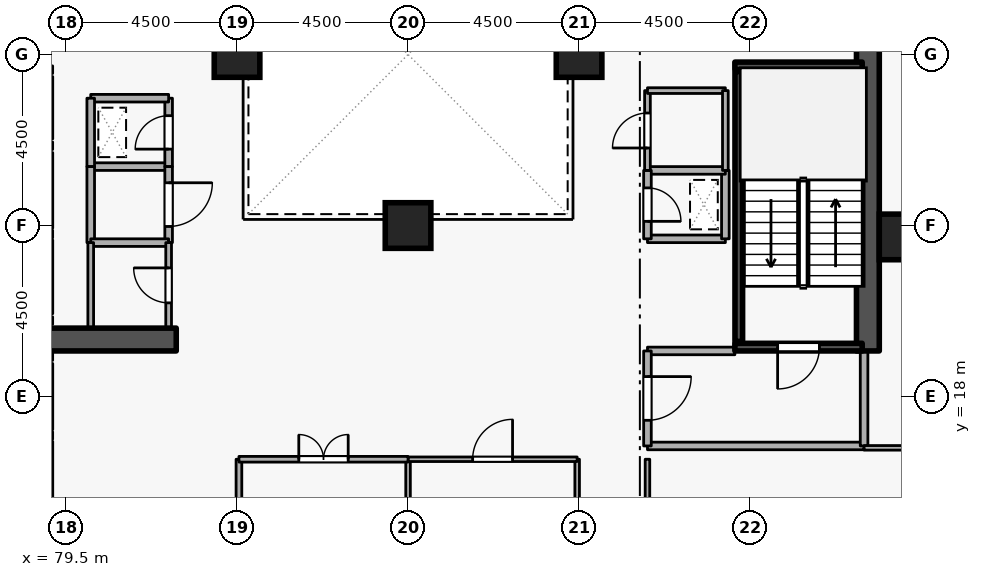
"""IFC4 building model, lengths in metres.
Left out: names, types, materials, properties, quantities, classifications, styles, units other than length and angle.
Written with IfcOpenShell. Run it as: python <this file> out.ifc"""

import sys

from ifc_helpers import new_model, si_unit, direction, frame, frame_2d, origin, origin_2d, place, context, subcontext, project, spatial, rectangle, extrude, element, fill, save


model = new_model("IFC4")
c1 = context("Model", 3, precision=1e-05, world=origin(), true_north=direction((0.0, 1.0)))
c2 = subcontext(c1, "Body", "Model", "MODEL_VIEW")
j1 = project(units=[si_unit("LENGTHUNIT", "METRE"), si_unit("PLANEANGLEUNIT", "RADIAN")], contexts=[c1])
p1 = place(None, origin())
s1 = spatial("IfcSite", under=j1, at=p1, CompositionType="ELEMENT")
p2 = place(p1, origin())
s2 = spatial("IfcBuilding", under=s1, at=p2, CompositionType="ELEMENT")
p3 = place(p2, frame((0.0, 0.0, 83.7)))
s3 = spatial("IfcBuildingStorey", under=s2, at=p3, CompositionType="ELEMENT", Elevation=83.7)
p4 = place(p3, frame((100.6, 19.2, 0.0), z_axis=(0.0, 0.0, 1.0), x_axis=(0.0, 1.0, 0.0)))
e1 = element("IfcWall", 1, at=p4, inside=s3, PredefinedType="SHEAR", context=c2, shape_type="SweptSolid", body=[
    extrude(rectangle(XDim=15.6, YDim=0.6, at=frame_2d((7.8, 0.0))), origin(), (0.0, 0.0, 1.0), 3.6),
])
p5 = place(p3, frame((76.7, 19.5, 0.0), z_axis=(0.0, 0.0, 1.0), x_axis=(1.0, 0.0, 0.0)))
e2 = element("IfcWall", 2, at=p5, inside=s3, PredefinedType="SHEAR", context=c2, shape_type="SweptSolid", body=[
    extrude(rectangle(XDim=5.7, YDim=0.6, at=frame_2d((2.85, 0.0))), origin(), (0.0, 0.0, 1.0), 3.6),
])
for number, where, z_axis, x_axis in (
    (3, (101.5, 22.2, 0.0), (0.0, 0.0, 1.0), (1.0, 0.0, 0.0)),
    (4, (93.0, 27.0, 0.0), (0.0, 0.0, 1.0), (1.0, 0.0, 0.0)),
    (5, (84.0, 27.0, 0.0), (0.0, 0.0, 1.0), (1.0, 0.0, 0.0)),
    (6, (88.5, 22.5, 0.0), (0.0, 0.0, 1.0), (1.0, 0.0, 0.0)),
):
    element("IfcColumn", number, at=place(p3, frame(where, z_axis=z_axis, x_axis=x_axis)), inside=s3, PredefinedType="COLUMN", context=c2, shape_type="SweptSolid", body=[
        extrude(rectangle(XDim=1.2, YDim=1.2, at=origin_2d()), origin(), (0.0, 0.0, 1.0), 3.6),
    ])
p6 = place(p3, frame((79.05, 24.78, 0.0), z_axis=(0.0, 0.0, 1.0), x_axis=(0.0, 1.0, 0.0)))
e7 = element("IfcWall", 7, at=p6, inside=s3, PredefinedType="STANDARD", context=c2, shape_type="SweptSolid", body=[
    extrude(rectangle(XDim=1.64, YDim=0.2, at=frame_2d((0.82, 0.0))), origin(), (0.0, 0.0, 1.0), 3.34),
])
p7 = place(p6, frame((0.31, 0.0, 0.0)))
e8 = element("IfcOpeningElement", 8, at=p7, cuts=e7, PredefinedType="OPENING", context=c2, shape_type="SweptSolid", body=[
    extrude(rectangle(XDim=1.02, YDim=2.06, at=frame_2d((0.51, 1.03))), frame((0.0, 0.11, 0.0), z_axis=(0.0, -1.0, 0.0), x_axis=(1.0, 0.0, 0.0)), (0.0, 0.0, 1.0), 0.22),
])
p8 = place(p3, frame((79.05, 22.43, 0.0), z_axis=(0.0, 0.0, 1.0), x_axis=(0.0, 1.0, 0.0)))
e9 = element("IfcWall", 9, at=p8, inside=s3, PredefinedType="STANDARD", context=c2, shape_type="SweptSolid", body=[
    extrude(rectangle(XDim=1.99, YDim=0.2, at=frame_2d((0.995, 0.0))), origin(), (0.0, 0.0, 1.0), 3.34),
])
p9 = place(p3, frame((79.05, 20.18, 0.0), z_axis=(0.0, 0.0, 1.0), x_axis=(0.0, 1.0, 0.0)))
e10 = element("IfcWall", 10, at=p9, inside=s3, PredefinedType="STANDARD", context=c2, shape_type="SweptSolid", body=[
    extrude(rectangle(XDim=1.94, YDim=0.2, at=frame_2d((0.97, 0.0))), origin(), (0.0, 0.0, 1.0), 3.34),
])
p10 = place(p3, frame((79.05, 17.13, 0.0), z_axis=(0.0, 0.0, 1.0), x_axis=(0.0, 1.0, 0.0)))
e11 = element("IfcWall", 11, at=p10, inside=s3, PredefinedType="STANDARD", context=c2, shape_type="SweptSolid", body=[
    extrude(rectangle(XDim=1.74, YDim=0.2, at=frame_2d((0.87, 0.0))), origin(), (0.0, 0.0, 1.0), 3.34),
])
p11 = place(p10, frame((0.36, 0.0, 0.0)))
e12 = element("IfcOpeningElement", 12, at=p11, cuts=e11, PredefinedType="OPENING", context=c2, shape_type="SweptSolid", body=[
    extrude(rectangle(XDim=1.02, YDim=2.06, at=frame_2d((0.51, 1.03))), frame((0.0, 0.11, 0.0), z_axis=(0.0, -1.0, 0.0), x_axis=(1.0, 0.0, 0.0)), (0.0, 0.0, 1.0), 0.22),
])
p12 = place(p3, frame((79.05, 15.03, 0.0), z_axis=(0.0, 0.0, 1.0), x_axis=(0.0, 1.0, 0.0)))
e13 = element("IfcWall", 13, at=p12, inside=s3, PredefinedType="STANDARD", context=c2, shape_type="SweptSolid", body=[
    extrude(rectangle(XDim=1.79, YDim=0.2, at=frame_2d((0.895, 0.0))), origin(), (0.0, 0.0, 1.0), 3.34),
])
p13 = place(p12, frame((0.385, 0.0, 0.0)))
e14 = element("IfcOpeningElement", 14, at=p13, cuts=e13, PredefinedType="OPENING", context=c2, shape_type="SweptSolid", body=[
    extrude(rectangle(XDim=1.02, YDim=2.06, at=frame_2d((0.51, 1.03))), frame((0.0, 0.11, 0.0), z_axis=(0.0, -1.0, 0.0), x_axis=(1.0, 0.0, 0.0)), (0.0, 0.0, 1.0), 0.22),
])
p14 = place(p3, frame((100.45, 19.3, 0.0), z_axis=(0.0, 0.0, 1.0), x_axis=(-1.0, 0.0, 0.0)))
e15 = element("IfcWall", 15, at=p14, inside=s3, PredefinedType="SHEAR", context=c2, shape_type="SweptSolid", body=[
    extrude(rectangle(XDim=3.35, YDim=0.2, at=frame_2d((1.675, 0.0))), origin(), (0.0, 0.0, 1.0), 3.6),
])
p15 = place(p14, frame((1.125, 0.0, 0.0)))
e16 = element("IfcOpeningElement", 16, at=p15, cuts=e15, PredefinedType="OPENING", context=c2, shape_type="SweptSolid", body=[
    extrude(rectangle(XDim=1.1, YDim=2.1, at=frame_2d((0.55, 1.05))), frame((0.0, 0.11, 0.0), z_axis=(0.0, -1.0, 0.0), x_axis=(1.0, 0.0, 0.0)), (0.0, 0.0, 1.0), 0.22),
])
p16 = place(p3, frame((97.1, 26.7, 0.0), z_axis=(0.0, 0.0, 1.0), x_axis=(1.0, 0.0, 0.0)))
e17 = element("IfcWall", 17, at=p16, inside=s3, PredefinedType="SHEAR", context=c2, shape_type="SweptSolid", body=[
    extrude(rectangle(XDim=3.35, YDim=0.2, at=frame_2d((1.675, 0.0))), origin(), (0.0, 0.0, 1.0), 3.6),
])
p17 = place(p3, frame((97.203, 26.55, 0.0), z_axis=(0.0, 0.0, 1.0), x_axis=(0.0, -1.0, 0.0)))
e18 = element("IfcWall", 18, at=p17, inside=s3, PredefinedType="SHEAR", context=c2, shape_type="SweptSolid", body=[
    extrude(rectangle(XDim=7.1, YDim=0.2, at=frame_2d((3.55, 0.0))), origin(), (0.0, 0.0, 1.0), 3.6),
])
p18 = place(p3, frame((94.8, 16.7, 0.0), z_axis=(0.0, 0.0, 1.0), x_axis=(1.0, 0.0, 0.0)))
e19 = element("IfcWall", 19, at=p18, inside=s3, PredefinedType="STANDARD", context=c2, shape_type="SweptSolid", body=[
    extrude(rectangle(XDim=5.7, YDim=0.2, at=frame_2d((2.85, 0.0))), origin(), (0.0, 0.0, 1.0), 3.34),
])
p19 = place(p3, frame((100.5, 16.7, 0.0), z_axis=(0.0, 0.0, 1.0), x_axis=(0.0, 1.0, 0.0)))
e20 = element("IfcWall", 20, at=p19, inside=s3, PredefinedType="STANDARD", context=c2, shape_type="SweptSolid", body=[
    extrude(rectangle(XDim=2.5, YDim=0.2, at=frame_2d((1.25, 0.0))), origin(), (0.0, 0.0, 1.0), 3.34),
])
p20 = place(p3, frame((97.1, 19.2, 0.0), z_axis=(0.0, 0.0, 1.0), x_axis=(-1.0, 0.0, 0.0)))
e21 = element("IfcWall", 21, at=p20, inside=s3, PredefinedType="STANDARD", context=c2, shape_type="SweptSolid", body=[
    extrude(rectangle(XDim=2.3, YDim=0.2, at=frame_2d((1.15, 0.0))), origin(), (0.0, 0.0, 1.0), 2.545),
])
p21 = place(p3, frame((94.8, 19.2, 0.0), z_axis=(0.0, 0.0, 1.0), x_axis=(0.0, -1.0, 0.0)))
e22 = element("IfcWall", 22, at=p21, inside=s3, PredefinedType="STANDARD", context=c2, shape_type="SweptSolid", body=[
    extrude(rectangle(XDim=2.5, YDim=0.2, at=frame_2d((1.25, 0.0))), origin(), (0.0, 0.0, 1.0), 3.34),
])
p22 = place(p21, frame((0.675, 0.0, 0.0)))
e23 = element("IfcOpeningElement", 23, at=p22, cuts=e22, PredefinedType="OPENING", context=c2, shape_type="SweptSolid", body=[
    extrude(rectangle(XDim=1.15, YDim=2.1, at=frame_2d((0.575, 1.05))), frame((0.0, 0.11, 0.0), z_axis=(0.0, -1.0, 0.0), x_axis=(1.0, 0.0, 0.0)), (0.0, 0.0, 1.0), 0.22),
])
p23 = place(p3, frame((94.8, 22.15, 0.0), z_axis=(0.0, 0.0, 1.0), x_axis=(1.0, 0.0, 0.0)))
e24 = element("IfcWall", 24, at=p23, inside=s3, PredefinedType="STANDARD", context=c2, shape_type="SweptSolid", body=[
    extrude(rectangle(XDim=2.05, YDim=0.2, at=frame_2d((1.025, 0.0))), origin(), (0.0, 0.0, 1.0), 3.34),
])
p24 = place(p3, frame((96.85, 22.15, 0.0), z_axis=(0.0, 0.0, 1.0), x_axis=(0.0, 1.0, 0.0)))
e25 = element("IfcWall", 25, at=p24, inside=s3, PredefinedType="STANDARD", context=c2, shape_type="SweptSolid", body=[
    extrude(rectangle(XDim=1.8, YDim=0.2, at=frame_2d((0.9, 0.0))), origin(), (0.0, 0.0, 1.0), 3.34),
])
p25 = place(p3, frame((96.85, 23.95, 0.0), z_axis=(0.0, 0.0, 1.0), x_axis=(-1.0, 0.0, 0.0)))
e26 = element("IfcWall", 26, at=p25, inside=s3, PredefinedType="STANDARD", context=c2, shape_type="SweptSolid", body=[
    extrude(rectangle(XDim=2.05, YDim=0.2, at=frame_2d((1.025, 0.0))), origin(), (0.0, 0.0, 1.0), 3.34),
])
p26 = place(p3, frame((94.8, 23.95, 0.0), z_axis=(0.0, 0.0, 1.0), x_axis=(0.0, -1.0, 0.0)))
e27 = element("IfcWall", 27, at=p26, inside=s3, PredefinedType="STANDARD", context=c2, shape_type="SweptSolid", body=[
    extrude(rectangle(XDim=1.8, YDim=0.2, at=frame_2d((0.9, 0.0))), origin(), (0.0, 0.0, 1.0), 3.34),
])
p27 = place(p26, frame((0.46, 0.0, 0.0)))
e28 = element("IfcOpeningElement", 28, at=p27, cuts=e27, PredefinedType="OPENING", context=c2, shape_type="SweptSolid", body=[
    extrude(rectangle(XDim=0.88, YDim=2.04, at=frame_2d((0.44, 1.02))), frame((0.0, 0.11, 0.0), z_axis=(0.0, -1.0, 0.0), x_axis=(1.0, 0.0, 0.0)), (0.0, 0.0, 1.0), 0.22),
])
p28 = place(p3, frame((80.15, 24.05, 0.0), z_axis=(0.0, 0.0, 1.0), x_axis=(1.0, 0.0, 0.0)))
e29 = element("IfcWall", 29, at=p28, inside=s3, PredefinedType="STANDARD", context=c2, shape_type="SweptSolid", body=[
    extrude(rectangle(XDim=2.05, YDim=0.2, at=frame_2d((1.025, 0.0))), origin(), (0.0, 0.0, 1.0), 3.34),
])
p29 = place(p3, frame((82.2, 24.05, 0.0), z_axis=(0.0, 0.0, 1.0), x_axis=(0.0, 1.0, 0.0)))
e30 = element("IfcWall", 30, at=p29, inside=s3, PredefinedType="STANDARD", context=c2, shape_type="SweptSolid", body=[
    extrude(rectangle(XDim=1.8, YDim=0.2, at=frame_2d((0.9, 0.0))), origin(), (0.0, 0.0, 1.0), 3.34),
])
p30 = place(p29, frame((0.46, 0.0, 0.0)))
e31 = element("IfcOpeningElement", 31, at=p30, cuts=e30, PredefinedType="OPENING", context=c2, shape_type="SweptSolid", body=[
    extrude(rectangle(XDim=0.88, YDim=2.04, at=frame_2d((0.44, 1.02))), frame((0.0, 0.11, 0.0), z_axis=(0.0, -1.0, 0.0), x_axis=(1.0, 0.0, 0.0)), (0.0, 0.0, 1.0), 0.22),
])
p31 = place(p3, frame((82.2, 25.85, 0.0), z_axis=(0.0, 0.0, 1.0), x_axis=(-1.0, 0.0, 0.0)))
e32 = element("IfcWall", 32, at=p31, inside=s3, PredefinedType="STANDARD", context=c2, shape_type="SweptSolid", body=[
    extrude(rectangle(XDim=2.05, YDim=0.2, at=frame_2d((1.025, 0.0))), origin(), (0.0, 0.0, 1.0), 3.34),
])
p32 = place(p3, frame((80.15, 25.85, 0.0), z_axis=(0.0, 0.0, 1.0), x_axis=(0.0, -1.0, 0.0)))
e33 = element("IfcWall", 33, at=p32, inside=s3, PredefinedType="STANDARD", context=c2, shape_type="SweptSolid", body=[
    extrude(rectangle(XDim=1.8, YDim=0.2, at=frame_2d((0.9, 0.0))), origin(), (0.0, 0.0, 1.0), 3.34),
])
p33 = place(p3, frame((80.15, 22.05, 0.0), z_axis=(0.0, 0.0, 1.0), x_axis=(0.0, 1.0, 0.0)))
e34 = element("IfcWall", 34, at=p33, inside=s3, PredefinedType="STANDARD", context=c2, shape_type="SweptSolid", body=[
    extrude(rectangle(XDim=2.0, YDim=0.2, at=frame_2d((1.0, 0.0))), origin(), (0.0, 0.0, 1.0), 3.34),
])
p34 = place(p3, frame((82.2, 24.05, 0.0), z_axis=(0.0, 0.0, 1.0), x_axis=(0.0, -1.0, 0.0)))
e35 = element("IfcWall", 35, at=p34, inside=s3, PredefinedType="STANDARD", context=c2, shape_type="SweptSolid", body=[
    extrude(rectangle(XDim=2.0, YDim=0.2, at=frame_2d((1.0, 0.0))), origin(), (0.0, 0.0, 1.0), 3.34),
])
p35 = place(p34, frame((0.425, 0.0, 0.0)))
e36 = element("IfcOpeningElement", 36, at=p35, cuts=e35, PredefinedType="OPENING", context=c2, shape_type="SweptSolid", body=[
    extrude(rectangle(XDim=1.15, YDim=2.1, at=frame_2d((0.575, 1.05))), frame((0.0, 0.11, 0.0), z_axis=(0.0, -1.0, 0.0), x_axis=(1.0, 0.0, 0.0)), (0.0, 0.0, 1.0), 0.22),
])
p36 = place(p3, frame((82.2, 22.05, 0.0), z_axis=(0.0, 0.0, 1.0), x_axis=(-1.0, 0.0, 0.0)))
e37 = element("IfcWall", 37, at=p36, inside=s3, PredefinedType="STANDARD", context=c2, shape_type="SweptSolid", body=[
    extrude(rectangle(XDim=2.05, YDim=0.2, at=frame_2d((1.025, 0.0))), origin(), (0.0, 0.0, 1.0), 3.34),
])
p37 = place(p3, frame((94.8, 23.95, 0.0), z_axis=(0.0, 0.0, 1.0), x_axis=(0.0, 1.0, 0.0)))
e38 = element("IfcWall", 38, at=p37, inside=s3, PredefinedType="PARTITIONING", context=c2, shape_type="SweptSolid", body=[
    extrude(rectangle(XDim=2.1, YDim=0.15, at=frame_2d((1.05, 0.0))), origin(), (0.0, 0.0, 1.0), 3.34),
])
p38 = place(p37, frame((0.59, 0.0, 0.0)))
e39 = element("IfcOpeningElement", 39, at=p38, cuts=e38, PredefinedType="OPENING", context=c2, shape_type="SweptSolid", body=[
    extrude(rectangle(XDim=0.92, YDim=2.08, at=frame_2d((0.46, 1.04))), frame((0.0, 0.085, 0.0), z_axis=(0.0, -1.0, 0.0), x_axis=(1.0, 0.0, 0.0)), (0.0, 0.0, 1.0), 0.17),
])
p39 = place(p3, frame((94.8, 26.05, 0.0), z_axis=(0.0, 0.0, 1.0), x_axis=(1.0, 0.0, 0.0)))
e40 = element("IfcWall", 40, at=p39, inside=s3, PredefinedType="PARTITIONING", context=c2, shape_type="SweptSolid", body=[
    extrude(rectangle(XDim=2.05, YDim=0.15, at=frame_2d((1.025, 0.0))), origin(), (0.0, 0.0, 1.0), 3.34),
])
p40 = place(p3, frame((96.85, 26.05, 0.0), z_axis=(0.0, 0.0, 1.0), x_axis=(0.0, -1.0, 0.0)))
e41 = element("IfcWall", 41, at=p40, inside=s3, PredefinedType="PARTITIONING", context=c2, shape_type="SweptSolid", body=[
    extrude(rectangle(XDim=2.1, YDim=0.15, at=frame_2d((1.05, 0.0))), origin(), (0.0, 0.0, 1.0), 3.34),
])
p41 = place(p3, frame((82.2, 19.8, 0.0), z_axis=(0.0, 0.0, 1.0), x_axis=(0.0, 1.0, 0.0)))
e42 = element("IfcWall", 42, at=p41, inside=s3, PredefinedType="PARTITIONING", context=c2, shape_type="SweptSolid", body=[
    extrude(rectangle(XDim=2.25, YDim=0.15, at=frame_2d((1.125, 0.0))), origin(), (0.0, 0.0, 1.0), 3.34),
])
p42 = place(p41, frame((0.665, 0.0, 0.0)))
e43 = element("IfcOpeningElement", 43, at=p42, cuts=e42, PredefinedType="OPENING", context=c2, shape_type="SweptSolid", body=[
    extrude(rectangle(XDim=0.92, YDim=2.08, at=frame_2d((0.46, 1.04))), frame((0.0, 0.085, 0.0), z_axis=(0.0, -1.0, 0.0), x_axis=(1.0, 0.0, 0.0)), (0.0, 0.0, 1.0), 0.17),
])
p43 = place(p3, frame((80.15, 22.05, 0.0), z_axis=(0.0, 0.0, 1.0), x_axis=(0.0, -1.0, 0.0)))
e44 = element("IfcWall", 44, at=p43, inside=s3, PredefinedType="PARTITIONING", context=c2, shape_type="SweptSolid", body=[
    extrude(rectangle(XDim=2.25, YDim=0.15, at=frame_2d((1.125, 0.0))), origin(), (0.0, 0.0, 1.0), 3.34),
])
for number, where, z_axis, x_axis in (
    (45, (92.95, 16.35, 0.0), (0.0, 0.0, 1.0), (0.0, -1.0, 0.0)),
    (46, (94.8, 14.75, 0.0), (0.0, 0.0, 1.0), (0.0, 1.0, 0.0)),
):
    element("IfcWall", number, at=place(p3, frame(where, z_axis=z_axis, x_axis=x_axis)), inside=s3, PredefinedType="PARTITIONING", context=c2, shape_type="SweptSolid", body=[
        extrude(rectangle(XDim=1.6, YDim=0.12, at=frame_2d((0.8, 0.0))), origin(), (0.0, 0.0, 1.0), 3.34),
    ])
p44 = place(p3, frame((100.5, 16.65, 0.0), z_axis=(0.0, 0.0, 1.0), x_axis=(1.0, 0.0, 0.0)))
e47 = element("IfcWall", 47, at=p44, inside=s3, PredefinedType="PARTITIONING", context=c2, shape_type="SweptSolid", body=[
    extrude(rectangle(XDim=5.92, YDim=0.12, at=frame_2d((2.96, 0.0))), origin(), (0.0, 0.0, 1.0), 3.34),
])
p45 = place(p3, frame((88.5, 9.08, 0.0), z_axis=(0.0, 0.0, 1.0), x_axis=(0.0, 1.0, 0.0)))
e48 = element("IfcWall", 48, at=p45, inside=s3, PredefinedType="PARTITIONING", context=c2, shape_type="SweptSolid", body=[
    extrude(rectangle(XDim=7.27, YDim=0.12, at=frame_2d((3.635, 0.0))), origin(), (0.0, 0.0, 1.0), 2.882),
])
p46 = place(p3, frame((88.5, 16.35, 0.0), z_axis=(0.0, 0.0, 1.0), x_axis=(1.0, 0.0, 0.0)))
e49 = element("IfcWall", 49, at=p46, inside=s3, PredefinedType="PARTITIONING", context=c2, shape_type="SweptSolid", body=[
    extrude(rectangle(XDim=4.45, YDim=0.12, at=frame_2d((2.225, 0.0))), origin(), (0.0, 0.0, 1.0), 3.34),
])
p47 = place(p46, frame((1.7, 0.0, 0.0)))
e50 = element("IfcOpeningElement", 50, at=p47, cuts=e49, PredefinedType="OPENING", context=c2, shape_type="SweptSolid", body=[
    extrude(rectangle(XDim=1.05, YDim=2.1, at=frame_2d((0.525, 1.05))), frame((0.0, 0.07, 0.0), z_axis=(0.0, -1.0, 0.0), x_axis=(1.0, 0.0, 0.0)), (0.0, 0.0, 1.0), 0.14),
])
p48 = place(p3, frame((84.05, 14.75, 0.0), z_axis=(0.0, 0.0, 1.0), x_axis=(0.0, 1.0, 0.0)))
e51 = element("IfcWall", 51, at=p48, inside=s3, PredefinedType="PARTITIONING", context=c2, shape_type="SweptSolid", body=[
    extrude(rectangle(XDim=1.6, YDim=0.15, at=frame_2d((0.8, 0.0))), origin(), (0.0, 0.0, 1.0), 3.34),
])
p49 = place(p3, frame((84.05, 16.35, 0.0), z_axis=(0.0, 0.0, 1.0), x_axis=(1.0, 0.0, 0.0)))
e52 = element("IfcWall", 52, at=p49, inside=s3, PredefinedType="PARTITIONING", context=c2, shape_type="SweptSolid", body=[
    extrude(rectangle(XDim=4.45, YDim=0.15, at=frame_2d((2.225, 0.0))), origin(), (0.0, 0.0, 1.0), 3.34),
])
p50 = place(p49, frame((1.575, 0.0, 0.0)))
e53 = element("IfcOpeningElement", 53, at=p50, cuts=e52, PredefinedType="OPENING", context=c2, shape_type="SweptSolid", body=[
    extrude(rectangle(XDim=1.3, YDim=2.12, at=frame_2d((0.65, 1.06))), frame((0.0, 0.085, 0.0), z_axis=(0.0, -1.0, 0.0), x_axis=(1.0, 0.0, 0.0)), (0.0, 0.0, 1.0), 0.17),
])
p51 = place(p15, origin())
e54 = element("IfcDoor", 54, at=p51, inside=s3, OperationType="SINGLE_SWING_RIGHT", PredefinedType="DOOR", context=c2, shape_type="SweptSolid", body=[
    extrude(rectangle(XDim=1.1, YDim=2.1, at=frame_2d((0.55, 1.05))), frame((0.0, 0.025, 0.0), z_axis=(0.0, -1.0, 0.0), x_axis=(1.0, 0.0, 0.0)), (0.0, 0.0, 1.0), 0.05),
])
fill(e16, e54)
p52 = place(p22, origin())
e55 = element("IfcDoor", 55, at=p52, inside=s3, OperationType="SINGLE_SWING_LEFT", PredefinedType="DOOR", context=c2, shape_type="SweptSolid", body=[
    extrude(rectangle(XDim=1.15, YDim=2.1, at=frame_2d((0.575, 1.05))), frame((0.0, 0.025, 0.0), z_axis=(0.0, -1.0, 0.0), x_axis=(1.0, 0.0, 0.0)), (0.0, 0.0, 1.0), 0.05),
])
fill(e23, e55)
p53 = place(p27, origin())
e56 = element("IfcDoor", 56, at=p53, inside=s3, OperationType="SINGLE_SWING_RIGHT", PredefinedType="DOOR", context=c2, shape_type="SweptSolid", body=[
    extrude(rectangle(XDim=0.88, YDim=2.04, at=frame_2d((0.44, 1.02))), frame((0.0, 0.025, 0.0), z_axis=(0.0, -1.0, 0.0), x_axis=(1.0, 0.0, 0.0)), (0.0, 0.0, 1.0), 0.05),
])
fill(e28, e56)
p54 = place(p30, origin())
e57 = element("IfcDoor", 57, at=p54, inside=s3, OperationType="SINGLE_SWING_LEFT", PredefinedType="DOOR", context=c2, shape_type="SweptSolid", body=[
    extrude(rectangle(XDim=0.88, YDim=2.04, at=frame_2d((0.44, 1.02))), frame((0.0, 0.025, 0.0), z_axis=(0.0, -1.0, 0.0), x_axis=(1.0, 0.0, 0.0)), (0.0, 0.0, 1.0), 0.05),
])
fill(e31, e57)
p55 = place(p38, origin())
e58 = element("IfcDoor", 58, at=p55, inside=s3, OperationType="SINGLE_SWING_LEFT", PredefinedType="DOOR", context=c2, shape_type="SweptSolid", body=[
    extrude(rectangle(XDim=0.92, YDim=2.08, at=frame_2d((0.46, 1.04))), frame((0.0, 0.025, 0.0), z_axis=(0.0, -1.0, 0.0), x_axis=(1.0, 0.0, 0.0)), (0.0, 0.0, 1.0), 0.05),
])
fill(e39, e58)
p56 = place(p42, origin())
e59 = element("IfcDoor", 59, at=p56, inside=s3, OperationType="SINGLE_SWING_RIGHT", PredefinedType="DOOR", context=c2, shape_type="SweptSolid", body=[
    extrude(rectangle(XDim=0.92, YDim=2.08, at=frame_2d((0.46, 1.04))), frame((0.0, 0.025, 0.0), z_axis=(0.0, -1.0, 0.0), x_axis=(1.0, 0.0, 0.0)), (0.0, 0.0, 1.0), 0.05),
])
fill(e43, e59)
p57 = place(p35, origin())
e60 = element("IfcDoor", 60, at=p57, inside=s3, OperationType="SINGLE_SWING_LEFT", PredefinedType="DOOR", context=c2, shape_type="SweptSolid", body=[
    extrude(rectangle(XDim=1.15, YDim=2.1, at=frame_2d((0.575, 1.05))), frame((0.0, 0.025, 0.0), z_axis=(0.0, -1.0, 0.0), x_axis=(1.0, 0.0, 0.0)), (0.0, 0.0, 1.0), 0.05),
])
fill(e36, e60)
p58 = place(p47, origin())
e61 = element("IfcDoor", 61, at=p58, inside=s3, OperationType="SINGLE_SWING_RIGHT", PredefinedType="DOOR", context=c2, shape_type="SweptSolid", body=[
    extrude(rectangle(XDim=1.05, YDim=2.1, at=frame_2d((0.525, 1.05))), frame((0.0, 0.025, 0.0), z_axis=(0.0, -1.0, 0.0), x_axis=(1.0, 0.0, 0.0)), (0.0, 0.0, 1.0), 0.05),
])
fill(e50, e61)
p59 = place(p50, origin())
e62 = element("IfcDoor", 62, at=p59, inside=s3, OperationType="DOUBLE_DOOR_SINGLE_SWING", PredefinedType="DOOR", context=c2, shape_type="SweptSolid", body=[
    extrude(rectangle(XDim=1.3, YDim=2.12, at=frame_2d((0.65, 1.06))), frame((0.0, 0.025, 0.0), z_axis=(0.0, -1.0, 0.0), x_axis=(1.0, 0.0, 0.0)), (0.0, 0.0, 1.0), 0.05),
])
fill(e53, e62)
save(model, sys.argv[1])
